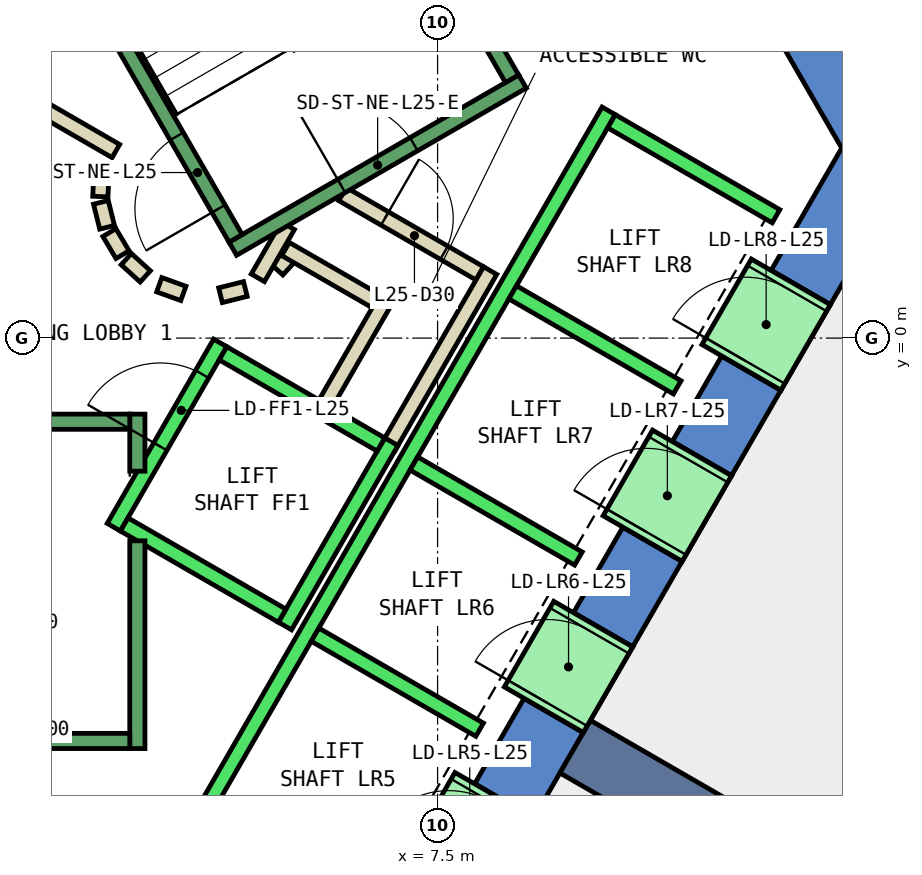
"""IFC4 building model, lengths in metres.
Left out: names, types, materials, properties, quantities, classifications, styles, units other than length and angle.
Written with IfcOpenShell. Run it as: python <this file> out.ifc"""

import sys

from ifc_helpers import new_model, si_unit, direction, frame, frame_2d, origin, place, context, subcontext, project, spatial, polyline, rectangle, outline, extrude, element, fill, save


model = new_model("IFC4")
c1 = context("Model", 3, precision=1e-05, world=origin(), true_north=direction((0.0, 1.0)))
c2 = subcontext(c1, "Body", "Model", "MODEL_VIEW")
j1 = project(units=[si_unit("LENGTHUNIT", "METRE"), si_unit("PLANEANGLEUNIT", "RADIAN")], contexts=[c1])
p1 = place(None, origin())
s1 = spatial("IfcSite", under=j1, at=p1, CompositionType="ELEMENT")
p2 = place(p1, origin())
s2 = spatial("IfcBuilding", under=s1, at=p2, CompositionType="ELEMENT")
p3 = place(p2, frame((0.0, 0.0, 116.0)))
s3 = spatial("IfcBuildingStorey", under=s2, at=p3, CompositionType="ELEMENT", Elevation=116.0)
p4 = place(p3, frame((0.0, 0.0, -0.4)))
e1 = element("IfcWall", 1, at=p4, inside=s3, PredefinedType="SHEAR", context=c2, shape_type="SweptSolid", body=[
    extrude(outline(polyline([(8.517, 11.748), (7.738, 11.298), (12.817, 2.5), (13.856, 2.5), (8.517, 11.748)])), origin(), (0.0, 0.0, 1.0), 4.2),
])
p5 = place(p3, frame((0.0, 0.0, -0.4)))
e2 = element("IfcWall", 2, at=p5, inside=s3, PredefinedType="SHEAR", context=c2, shape_type="SweptSolid", body=[
    extrude(outline(polyline([(9.417, -5.189), (8.638, -4.739), (7.988, -5.864), (8.767, -6.314), (9.417, -5.189)])), origin(), (0.0, 0.0, 1.0), 4.2),
])
p6 = place(p3, frame((0.0, 0.0, -0.4)))
e3 = element("IfcWall", 3, at=p6, inside=s3, PredefinedType="SHEAR", context=c2, shape_type="SweptSolid", body=[
    extrude(outline(polyline([(10.717, -2.937), (9.938, -2.487), (9.288, -3.613), (10.067, -4.063), (10.717, -2.937)])), origin(), (0.0, 0.0, 1.0), 4.2),
])
p7 = place(p3, frame((0.0, 0.0, -0.4)))
e4 = element("IfcWall", 4, at=p7, inside=s3, PredefinedType="SHEAR", context=c2, shape_type="SweptSolid", body=[
    extrude(outline(polyline([(12.017, -0.686), (11.238, -0.236), (10.588, -1.361), (11.367, -1.811), (12.017, -0.686)])), origin(), (0.0, 0.0, 1.0), 4.2),
])
p8 = place(p3, frame((0.0, 0.0, -0.4)))
e5 = element("IfcWall", 5, at=p8, inside=s3, PredefinedType="SHEAR", context=c2, shape_type="SweptSolid", body=[
    extrude(outline(polyline([(11.888, 0.89), (12.667, 0.44), (13.856, 2.5), (12.817, 2.5), (11.888, 0.89)])), origin(), (0.0, 0.0, 1.0), 4.2),
])
p9 = place(p3, frame((0.0, 0.0, 3.6)))
e6 = element("IfcWall", 6, at=p9, inside=s3, PredefinedType="SHEAR", context=c2, shape_type="SweptSolid", body=[
    extrude(outline(polyline([(8.767, -6.314), (7.988, -5.864), (7.338, -6.99), (8.117, -7.44), (8.767, -6.314)])), origin(), (0.0, 0.0, 1.0), 0.2),
])
p10 = place(p3, frame((0.0, 0.0, 3.6)))
e7 = element("IfcWall", 7, at=p10, inside=s3, PredefinedType="SHEAR", context=c2, shape_type="SweptSolid", body=[
    extrude(outline(polyline([(10.067, -4.063), (9.288, -3.613), (8.638, -4.739), (9.417, -5.189), (10.067, -4.063)])), origin(), (0.0, 0.0, 1.0), 0.2),
])
p11 = place(p3, frame((0.0, 0.0, 3.6)))
e8 = element("IfcWall", 8, at=p11, inside=s3, PredefinedType="SHEAR", context=c2, shape_type="SweptSolid", body=[
    extrude(outline(polyline([(11.367, -1.811), (10.588, -1.361), (9.938, -2.487), (10.717, -2.937), (11.367, -1.811)])), origin(), (0.0, 0.0, 1.0), 0.2),
])
p12 = place(p3, frame((0.0, 0.0, 3.6)))
e9 = element("IfcWall", 9, at=p12, inside=s3, PredefinedType="SHEAR", context=c2, shape_type="SweptSolid", body=[
    extrude(outline(polyline([(12.667, 0.44), (11.888, 0.89), (11.238, -0.236), (12.017, -0.686), (12.667, 0.44)])), origin(), (0.0, 0.0, 1.0), 0.2),
])
p13 = place(p3, frame((9.31, -5.375, -0.4), z_axis=(0.0, 0.0, 1.0), x_axis=(0.866017533419, -0.500013631625, 0.0)))
e10 = element("IfcWall", 10, at=p13, inside=s3, PredefinedType="SHEAR", context=c2, shape_type="SweptSolid", body=[
    extrude(rectangle(XDim=9.0, YDim=0.8, at=frame_2d((4.5, 0.0))), origin(), (0.0, 0.0, 1.0), 4.2),
])
p14 = place(p3, frame((5.39, 0.898, 0.0), z_axis=(0.0, 0.0, 1.0), x_axis=(0.673828488714, 0.738887791073, 0.0)))
e11 = element("IfcWall", 11, at=p14, inside=s3, PredefinedType="PARTITIONING", context=c2, shape_type="SweptSolid", body=[
    extrude(rectangle(XDim=0.263, YDim=0.2, at=frame_2d((0.131, 0.0))), origin(), (0.0, 0.0, 1.0), 3.8),
])
p15 = place(p3, frame((5.499, 1.172, 0.0), z_axis=(0.0, 0.0, 1.0), x_axis=(0.866333505267, -0.499465972466, 0.0)))
e12 = element("IfcWall", 12, at=p15, inside=s3, PredefinedType="PARTITIONING", context=c2, shape_type="SweptSolid", body=[
    extrude(rectangle(XDim=1.374, YDim=0.2, at=frame_2d((0.687, 0.0))), origin(), (0.0, 0.0, 1.0), 3.8),
])
p16 = place(p3, frame((6.826, 0.522, 0.0), z_axis=(0.0, 0.0, 1.0), x_axis=(-0.500016722714, -0.866015748706, 0.0)))
e13 = element("IfcWall", 13, at=p16, inside=s3, PredefinedType="PARTITIONING", context=c2, shape_type="SweptSolid", body=[
    extrude(rectangle(XDim=1.7, YDim=0.2, at=frame_2d((0.85, 0.0))), origin(), (0.0, 0.0, 1.0), 3.8),
])
p17 = place(p3, frame((6.25, 1.894, 0.0), z_axis=(0.0, 0.0, 1.0), x_axis=(0.866043184279, -0.499969202016, 0.0)))
e14 = element("IfcWall", 14, at=p17, inside=s3, PredefinedType="PARTITIONING", context=c2, shape_type="SweptSolid", body=[
    extrude(rectangle(XDim=2.084, YDim=0.2, at=frame_2d((1.042, 0.0))), origin(), (0.0, 0.0, 1.0), 3.8),
])
p18 = place(p17, frame((0.642, 0.0, 0.0)))
e15 = element("IfcOpeningElement", 15, at=p18, cuts=e14, PredefinedType="OPENING", context=c2, shape_type="SweptSolid", body=[
    extrude(rectangle(XDim=0.9, YDim=2.1, at=frame_2d((0.45, 1.05))), frame((0.0, 0.11, 0.0), z_axis=(0.0, -1.0, 0.0), x_axis=(1.0, 0.0, 0.0)), (0.0, 0.0, 1.0), 0.22),
])
p19 = place(p3, frame((8.192, 0.888, 0.0), z_axis=(0.0, 0.0, 1.0), x_axis=(-0.499940625693, -0.866059680843, 0.0)))
e16 = element("IfcWall", 16, at=p19, inside=s3, PredefinedType="PARTITIONING", context=c2, shape_type="SweptSolid", body=[
    extrude(rectangle(XDim=2.68, YDim=0.2, at=frame_2d((1.34, 0.0))), origin(), (0.0, 0.0, 1.0), 3.8),
])
p20 = place(p3, frame((5.135, 0.793, 0.0), z_axis=(0.0, 0.0, 1.0), x_axis=(0.499526442893, 0.866298639529, 0.0)))
e17 = element("IfcWall", 17, at=p20, inside=s3, PredefinedType="PARTITIONING", context=c2, shape_type="SweptSolid", body=[
    extrude(rectangle(XDim=0.791, YDim=0.2, at=frame_2d((0.396, 0.0))), origin(), (0.0, 0.0, 1.0), 3.8),
])
p21 = place(p3, frame((2.012, 3.186, 0.0), z_axis=(0.0, 0.0, 1.0), x_axis=(0.865891012941, -0.500232699559, 0.0)))
e18 = element("IfcWall", 18, at=p21, inside=s3, PredefinedType="PARTITIONING", context=c2, shape_type="SweptSolid", body=[
    extrude(rectangle(XDim=1.449, YDim=0.2, at=frame_2d((0.725, 0.0))), origin(), (0.0, 0.0, 1.0), 3.8),
])
p22 = place(p3, frame((3.079, 2.199, 0.0), z_axis=(0.0, 0.0, 1.0), x_axis=(-0.047771483479, -0.998858290933, 0.0)))
e19 = element("IfcWall", 19, at=p22, inside=s3, PredefinedType="PARTITIONING", context=c2, shape_type="SweptSolid", body=[
    extrude(rectangle(XDim=0.337, YDim=0.2, at=frame_2d((0.169, 0.0))), origin(), (0.0, 0.0, 1.0), 3.8),
])
p23 = place(p3, frame((3.07, 1.786, 0.0), z_axis=(0.0, 0.0, 1.0), x_axis=(0.242705583207, -0.970099994784, 0.0)))
e20 = element("IfcWall", 20, at=p23, inside=s3, PredefinedType="PARTITIONING", context=c2, shape_type="SweptSolid", body=[
    extrude(rectangle(XDim=0.338, YDim=0.2, at=frame_2d((0.169, 0.0))), origin(), (0.0, 0.0, 1.0), 3.8),
])
for number, where, z_axis, x_axis in (
    (21, (3.182, 1.388, 0.0), (0.0, 0.0, 1.0), (0.512, -0.859, 0.0)),
    (22, (3.404, 1.039, 0.0), (0.0, 0.0, 1.0), (0.74, -0.672, 0.0)),
):
    element("IfcWall", number, at=place(p3, frame(where, z_axis=z_axis, x_axis=x_axis)), inside=s3, PredefinedType="PARTITIONING", context=c2, shape_type="SweptSolid", body=[
        extrude(rectangle(XDim=0.338, YDim=0.2, at=frame_2d((0.169, 0.0))), origin(), (0.0, 0.0, 1.0), 3.8),
    ])
p24 = place(p3, frame((3.838, 0.702, 0.0), z_axis=(0.0, 0.0, 1.0), x_axis=(0.941035081519, -0.338308993895, 0.0)))
e23 = element("IfcWall", 23, at=p24, inside=s3, PredefinedType="PARTITIONING", context=c2, shape_type="SweptSolid", body=[
    extrude(rectangle(XDim=0.337, YDim=0.2, at=frame_2d((0.168, 0.0))), origin(), (0.0, 0.0, 1.0), 3.8),
])
p25 = place(p3, frame((4.644, 0.564, 0.0), z_axis=(0.0, 0.0, 1.0), x_axis=(0.969929076366, 0.243387729394, 0.0)))
e24 = element("IfcWall", 24, at=p25, inside=s3, PredefinedType="PARTITIONING", context=c2, shape_type="SweptSolid", body=[
    extrude(rectangle(XDim=0.337, YDim=0.2, at=frame_2d((0.168, 0.0))), origin(), (0.0, 0.0, 1.0), 3.8),
])
p26 = place(p3, frame((18.301, 2.598, 0.0), z_axis=(0.0, 0.0, 1.0), x_axis=(-0.49997732567, -0.866038494419, 0.0)))
e25 = element("IfcWall", 25, at=p26, inside=s3, PredefinedType="PARTITIONING", context=c2, shape_type="SweptSolid", body=[
    extrude(rectangle(XDim=11.0, YDim=0.2, at=frame_2d((5.5, 0.0))), origin(), (0.0, 0.0, 1.0), 3.8),
])
p27 = place(p3, frame((3.24, -2.488, 0.0), z_axis=(0.0, 0.0, 1.0), x_axis=(0.49994636267, 0.866056369097, 0.0)))
e26 = element("IfcWall", 26, at=p27, inside=s3, PredefinedType="STANDARD", context=c2, shape_type="SweptSolid", body=[
    extrude(rectangle(XDim=2.8, YDim=0.2, at=frame_2d((1.4, 0.0))), origin(), (0.0, 0.0, 1.0), 3.8),
])
p28 = place(p27, frame((1.225, 0.0, 0.0)))
e27 = element("IfcOpeningElement", 27, at=p28, cuts=e26, PredefinedType="OPENING", context=c2, shape_type="SweptSolid", body=[
    extrude(rectangle(XDim=1.1, YDim=2.1, at=frame_2d((0.55, 1.05))), frame((0.0, 0.11, 0.0), z_axis=(0.0, -1.0, 0.0), x_axis=(1.0, 0.0, 0.0)), (0.0, 0.0, 1.0), 0.22),
])
p29 = place(p3, frame((5.492, -3.788, 0.0), z_axis=(0.0, 0.0, 1.0), x_axis=(0.500011755427, 0.866018616679, 0.0)))
e28 = element("IfcWall", 28, at=p29, inside=s3, PredefinedType="STANDARD", context=c2, shape_type="SweptSolid", body=[
    extrude(rectangle(XDim=2.8, YDim=0.2, at=frame_2d((1.4, 0.0))), origin(), (0.0, 0.0, 1.0), 3.8),
])
p30 = place(p3, frame((3.377, -2.452, 0.0), z_axis=(0.0, 0.0, 1.0), x_axis=(0.865955154139, -0.50012165622, 0.0)))
e29 = element("IfcWall", 29, at=p30, inside=s3, PredefinedType="STANDARD", context=c2, shape_type="SweptSolid", body=[
    extrude(rectangle(XDim=2.4, YDim=0.2, at=frame_2d((1.2, 0.0))), origin(), (0.0, 0.0, 1.0), 3.8),
])
p31 = place(p3, frame((4.677, -0.2, 0.0), z_axis=(0.0, 0.0, 1.0), x_axis=(0.865973769406, -0.500089422704, 0.0)))
e30 = element("IfcWall", 30, at=p31, inside=s3, PredefinedType="STANDARD", context=c2, shape_type="SweptSolid", body=[
    extrude(rectangle(XDim=2.399, YDim=0.2, at=frame_2d((1.2, 0.0))), origin(), (0.0, 0.0, 1.0), 3.8),
])
p32 = place(p3, frame((4.451, -6.19, 0.0), z_axis=(0.0, 0.0, 1.0), x_axis=(0.50000090737, 0.866024879913, 0.0)))
e31 = element("IfcWall", 31, at=p32, inside=s3, PredefinedType="STANDARD", context=c2, shape_type="SweptSolid", body=[
    extrude(rectangle(XDim=10.6, YDim=0.2, at=frame_2d((5.3, 0.0))), origin(), (0.0, 0.0, 1.0), 3.8),
])
for number, where, z_axis, x_axis in (
    (32, (5.888, -3.902, 0.0), (0.0, 0.0, 1.0), (0.866, -0.5, 0.0)),
    (33, (7.188, -1.65, 0.0), (0.0, 0.0, 1.0), (0.866, -0.5, 0.0)),
    (34, (8.488, 0.602, 0.0), (0.0, 0.0, 1.0), (0.866, -0.5, 0.0)),
):
    element("IfcWall", number, at=place(p3, frame(where, z_axis=z_axis, x_axis=x_axis)), inside=s3, PredefinedType="STANDARD", context=c2, shape_type="SweptSolid", body=[
        extrude(rectangle(XDim=2.5, YDim=0.2, at=frame_2d((1.25, 0.0))), origin(), (0.0, 0.0, 1.0), 3.8),
    ])
p33 = place(p3, frame((9.788, 2.853, 0.0), z_axis=(0.0, 0.0, 1.0), x_axis=(0.865998541277, -0.500046524342, 0.0)))
e35 = element("IfcWall", 35, at=p33, inside=s3, PredefinedType="STANDARD", context=c2, shape_type="SweptSolid", body=[
    extrude(rectangle(XDim=2.5, YDim=0.2, at=frame_2d((1.25, 0.0))), origin(), (0.0, 0.0, 1.0), 3.8),
])
p34 = place(p3, frame((7.598, -7.14, 0.0), z_axis=(0.0, 0.0, 1.0), x_axis=(0.500362116554, 0.865816234728, 0.0)))
e36 = element("IfcWall", 36, at=p34, inside=s3, PredefinedType="STANDARD", context=c2, shape_type="SweptSolid", body=[
    extrude(rectangle(XDim=1.299, YDim=1.2, at=frame_2d((0.65, 0.0))), origin(), (0.0, 0.0, 1.0), 2.4),
])
p35 = place(p34, frame((0.1, 0.0, 0.0)))
e37 = element("IfcOpeningElement", 37, at=p35, cuts=e36, PredefinedType="OPENING", context=c2, shape_type="SweptSolid", body=[
    extrude(rectangle(XDim=1.1, YDim=2.3, at=frame_2d((0.55, 1.15))), frame((0.0, 0.61, 0.0), z_axis=(0.0, -1.0, 0.0), x_axis=(1.0, 0.0, 0.0)), (0.0, 0.0, 1.0), 1.22),
])
p36 = place(p3, frame((8.898, -4.889, 0.0), z_axis=(0.0, 0.0, 1.0), x_axis=(0.500036693733, 0.866004217611, 0.0)))
e38 = element("IfcWall", 38, at=p36, inside=s3, PredefinedType="STANDARD", context=c2, shape_type="SweptSolid", body=[
    extrude(rectangle(XDim=1.3, YDim=1.2, at=frame_2d((0.65, 0.0))), origin(), (0.0, 0.0, 1.0), 2.4),
])
p37 = place(p36, frame((0.1, 0.0, 0.0)))
e39 = element("IfcOpeningElement", 39, at=p37, cuts=e38, PredefinedType="OPENING", context=c2, shape_type="SweptSolid", body=[
    extrude(rectangle(XDim=1.1, YDim=2.3, at=frame_2d((0.55, 1.15))), frame((0.0, 0.61, 0.0), z_axis=(0.0, -1.0, 0.0), x_axis=(1.0, 0.0, 0.0)), (0.0, 0.0, 1.0), 1.22),
])
p38 = place(p3, frame((10.198, -2.637, 0.0), z_axis=(0.0, 0.0, 1.0), x_axis=(0.49989585183, 0.866085525409, 0.0)))
e40 = element("IfcWall", 40, at=p38, inside=s3, PredefinedType="STANDARD", context=c2, shape_type="SweptSolid", body=[
    extrude(rectangle(XDim=1.3, YDim=1.2, at=frame_2d((0.65, 0.0))), origin(), (0.0, 0.0, 1.0), 2.4),
])
p39 = place(p38, frame((0.1, 0.0, 0.0)))
e41 = element("IfcOpeningElement", 41, at=p39, cuts=e40, PredefinedType="OPENING", context=c2, shape_type="SweptSolid", body=[
    extrude(rectangle(XDim=1.1, YDim=2.3, at=frame_2d((0.55, 1.15))), frame((0.0, 0.61, 0.0), z_axis=(0.0, -1.0, 0.0), x_axis=(1.0, 0.0, 0.0)), (0.0, 0.0, 1.0), 1.22),
])
p40 = place(p3, frame((11.498, -0.385, 0.0), z_axis=(0.0, 0.0, 1.0), x_axis=(0.500221244143, 0.865897630733, 0.0)))
e42 = element("IfcWall", 42, at=p40, inside=s3, PredefinedType="STANDARD", context=c2, shape_type="SweptSolid", body=[
    extrude(rectangle(XDim=1.299, YDim=1.2, at=frame_2d((0.65, 0.0))), origin(), (0.0, 0.0, 1.0), 2.4),
])
p41 = place(p40, frame((0.1, 0.0, 0.0)))
e43 = element("IfcOpeningElement", 43, at=p41, cuts=e42, PredefinedType="OPENING", context=c2, shape_type="SweptSolid", body=[
    extrude(rectangle(XDim=1.1, YDim=2.3, at=frame_2d((0.55, 1.15))), frame((0.0, 0.61, 0.0), z_axis=(0.0, -1.0, 0.0), x_axis=(1.0, 0.0, 0.0)), (0.0, 0.0, 1.0), 1.22),
])
p42 = place(p3, frame((3.55, -2.667, 0.0), z_axis=(0.0, 0.0, 1.0), x_axis=(0.0, -1.0, 0.0)))
e44 = element("IfcWall", 44, at=p42, inside=s3, PredefinedType="STANDARD", context=c2, shape_type="SweptSolid", body=[
    extrude(rectangle(XDim=2.733, YDim=0.2, at=frame_2d((1.366, 0.0))), origin(), (0.0, 0.0, 1.0), 3.8),
])
p43 = place(p3, frame((3.55, -1.0, 0.0), z_axis=(0.0, 0.0, 1.0), x_axis=(0.0, -1.0, 0.0)))
e45 = element("IfcWall", 45, at=p43, inside=s3, PredefinedType="STANDARD", context=c2, shape_type="SweptSolid", body=[
    extrude(rectangle(XDim=0.751, YDim=0.2, at=frame_2d((0.375, 0.0))), origin(), (0.0, 0.0, 1.0), 3.8),
])
p44 = place(p3, frame((-3.45, -1.1, 0.0), z_axis=(0.0, 0.0, 1.0), x_axis=(1.0, 0.0, 0.0)))
e46 = element("IfcWall", 46, at=p44, inside=s3, PredefinedType="STANDARD", context=c2, shape_type="SweptSolid", body=[
    extrude(rectangle(XDim=6.9, YDim=0.2, at=frame_2d((3.45, 0.0))), origin(), (0.0, 0.0, 1.0), 3.8),
])
p45 = place(p44, frame((0.45, 0.0, 0.0)))
e47 = element("IfcOpeningElement", 47, at=p45, cuts=e46, PredefinedType="OPENING", context=c2, shape_type="SweptSolid", body=[
    extrude(rectangle(XDim=1.1, YDim=2.2, at=frame_2d((0.55, 1.1))), frame((0.0, 0.11, 0.0), z_axis=(0.0, -1.0, 0.0), x_axis=(1.0, 0.0, 0.0)), (0.0, 0.0, 1.0), 0.22),
])
p46 = place(p3, frame((-3.45, -5.3, 0.0), z_axis=(0.0, 0.0, 1.0), x_axis=(1.0, 0.0, 0.0)))
e48 = element("IfcWall", 48, at=p46, inside=s3, PredefinedType="STANDARD", context=c2, shape_type="SweptSolid", body=[
    extrude(rectangle(XDim=6.9, YDim=0.2, at=frame_2d((3.45, 0.0))), origin(), (0.0, 0.0, 1.0), 3.8),
])
p47 = place(p3, frame((4.806, 1.176, 0.0), z_axis=(0.0, 0.0, 1.0), x_axis=(0.866059941101, 0.499940174841, 0.0)))
e49 = element("IfcWall", 49, at=p47, inside=s3, PredefinedType="STANDARD", context=c2, shape_type="SweptSolid", body=[
    extrude(rectangle(XDim=4.4, YDim=0.2, at=frame_2d((2.2, 0.0))), origin(), (0.0, 0.0, 1.0), 3.8),
])
p48 = place(p47, frame((1.65, 0.0, 0.0)))
e50 = element("IfcOpeningElement", 50, at=p48, cuts=e49, PredefinedType="OPENING", context=c2, shape_type="SweptSolid", body=[
    extrude(rectangle(XDim=1.1, YDim=2.2, at=frame_2d((0.55, 1.1))), frame((0.0, 0.11, 0.0), z_axis=(0.0, -1.0, 0.0), x_axis=(1.0, 0.0, 0.0)), (0.0, 0.0, 1.0), 0.22),
])
p49 = place(p3, frame((4.843, 1.312, 0.0), z_axis=(0.0, 0.0, 1.0), x_axis=(-0.499963383562, 0.866046543262, 0.0)))
e51 = element("IfcWall", 51, at=p49, inside=s3, PredefinedType="STANDARD", context=c2, shape_type="SweptSolid", body=[
    extrude(rectangle(XDim=6.9, YDim=0.2, at=frame_2d((3.45, 0.0))), origin(), (0.0, 0.0, 1.0), 3.8),
])
p50 = place(p49, frame((0.45, 0.0, 0.0)))
e52 = element("IfcOpeningElement", 52, at=p50, cuts=e51, PredefinedType="OPENING", context=c2, shape_type="SweptSolid", body=[
    extrude(rectangle(XDim=1.1, YDim=2.2, at=frame_2d((0.55, 1.1))), frame((0.0, 0.11, 0.0), z_axis=(0.0, -1.0, 0.0), x_axis=(1.0, 0.0, 0.0)), (0.0, 0.0, 1.0), 0.22),
])
p51 = place(p3, frame((8.48, 3.412, 0.0), z_axis=(0.0, 0.0, 1.0), x_axis=(-0.499978703459, 0.866037698999, 0.0)))
e53 = element("IfcWall", 53, at=p51, inside=s3, PredefinedType="STANDARD", context=c2, shape_type="SweptSolid", body=[
    extrude(rectangle(XDim=6.9, YDim=0.2, at=frame_2d((3.45, 0.0))), origin(), (0.0, 0.0, 1.0), 3.8),
])
p52 = place(p18, origin())
e54 = element("IfcDoor", 54, at=p52, inside=s3, OperationType="SINGLE_SWING_LEFT", PredefinedType="DOOR", context=c2, shape_type="SweptSolid", body=[
    extrude(rectangle(XDim=0.9, YDim=2.1, at=frame_2d((0.45, 1.05))), frame((0.0, 0.025, 0.0), z_axis=(0.0, -1.0, 0.0), x_axis=(1.0, 0.0, 0.0)), (0.0, 0.0, 1.0), 0.05),
])
fill(e15, e54)
p53 = place(p37, origin())
e55 = element("IfcDoor", 55, at=p53, inside=s3, OperationType="SLIDING_TO_LEFT", PredefinedType="DOOR", context=c2, shape_type="SweptSolid", body=[
    extrude(rectangle(XDim=1.1, YDim=2.3, at=frame_2d((0.55, 1.15))), frame((0.0, 0.025, 0.0), z_axis=(0.0, -1.0, 0.0), x_axis=(1.0, 0.0, 0.0)), (0.0, 0.0, 1.0), 0.05),
])
fill(e39, e55)
p54 = place(p39, origin())
e56 = element("IfcDoor", 56, at=p54, inside=s3, OperationType="SLIDING_TO_LEFT", PredefinedType="DOOR", context=c2, shape_type="SweptSolid", body=[
    extrude(rectangle(XDim=1.1, YDim=2.3, at=frame_2d((0.55, 1.15))), frame((0.0, 0.025, 0.0), z_axis=(0.0, -1.0, 0.0), x_axis=(1.0, 0.0, 0.0)), (0.0, 0.0, 1.0), 0.05),
])
fill(e41, e56)
p55 = place(p41, origin())
e57 = element("IfcDoor", 57, at=p55, inside=s3, OperationType="SLIDING_TO_LEFT", PredefinedType="DOOR", context=c2, shape_type="SweptSolid", body=[
    extrude(rectangle(XDim=1.1, YDim=2.3, at=frame_2d((0.55, 1.15))), frame((0.0, 0.025, 0.0), z_axis=(0.0, -1.0, 0.0), x_axis=(1.0, 0.0, 0.0)), (0.0, 0.0, 1.0), 0.05),
])
fill(e43, e57)
p56 = place(p28, origin())
e58 = element("IfcDoor", 58, at=p56, inside=s3, OperationType="SLIDING_TO_LEFT", PredefinedType="DOOR", context=c2, shape_type="SweptSolid", body=[
    extrude(rectangle(XDim=1.1, YDim=2.1, at=frame_2d((0.55, 1.05))), frame((0.0, 0.025, 0.0), z_axis=(0.0, -1.0, 0.0), x_axis=(1.0, 0.0, 0.0)), (0.0, 0.0, 1.0), 0.05),
])
fill(e27, e58)
p57 = place(p50, origin())
e59 = element("IfcDoor", 59, at=p57, inside=s3, OperationType="SINGLE_SWING_LEFT", PredefinedType="DOOR", context=c2, shape_type="SweptSolid", body=[
    extrude(rectangle(XDim=1.1, YDim=2.2, at=frame_2d((0.55, 1.1))), frame((0.0, 0.025, 0.0), z_axis=(0.0, -1.0, 0.0), x_axis=(1.0, 0.0, 0.0)), (0.0, 0.0, 1.0), 0.05),
])
fill(e52, e59)
p58 = place(p48, origin())
e60 = element("IfcDoor", 60, at=p58, inside=s3, OperationType="SINGLE_SWING_LEFT", PredefinedType="DOOR", context=c2, shape_type="SweptSolid", body=[
    extrude(rectangle(XDim=1.1, YDim=2.2, at=frame_2d((0.55, 1.1))), frame((0.0, 0.025, 0.0), z_axis=(0.0, -1.0, 0.0), x_axis=(1.0, 0.0, 0.0)), (0.0, 0.0, 1.0), 0.05),
])
fill(e50, e60)
save(model, sys.argv[1])
